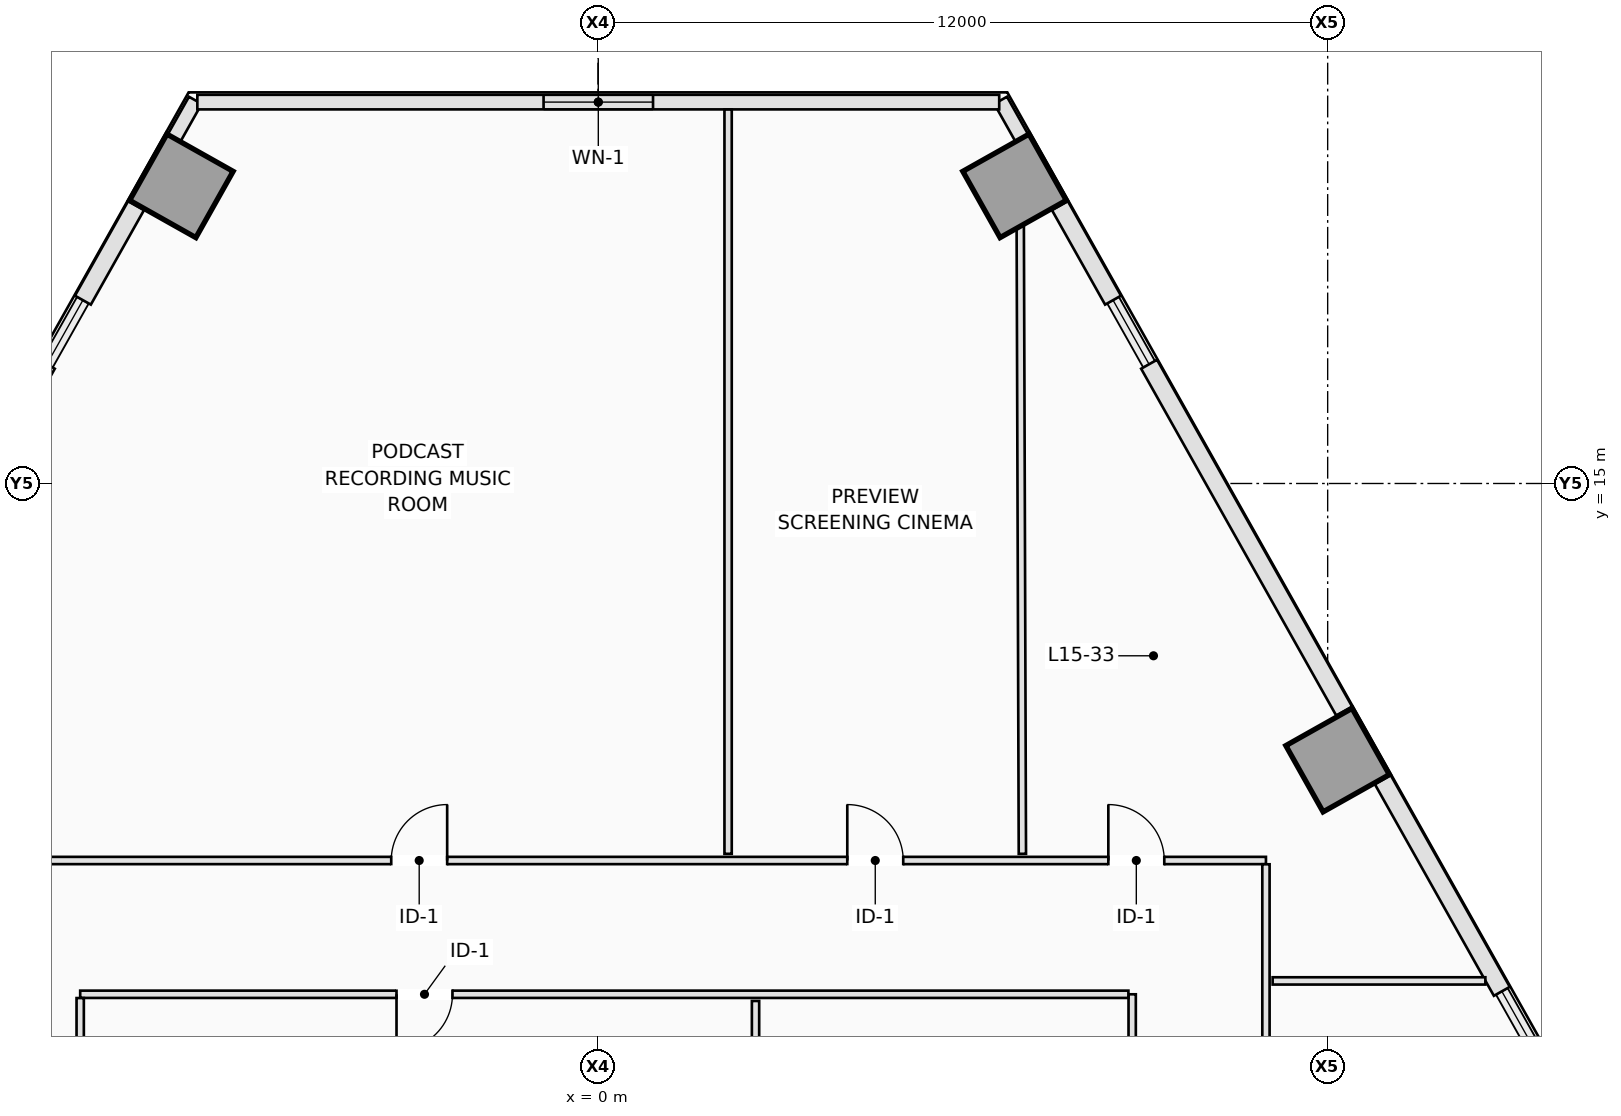
"""IFC4 building model, lengths in metres.
Left out: names, types, materials, properties, quantities, classifications, styles, units other than length and angle.
Written with IfcOpenShell. Run it as: python <this file> out.ifc"""

import sys

from ifc_helpers import new_model, si_unit, direction, frame, frame_2d, origin, origin_2d, place, context, subcontext, project, spatial, rectangle, extrude, element, fill, save


model = new_model("IFC4")
c1 = context("Model", 3, precision=1e-05, world=origin(), true_north=direction((0.0, 1.0)))
c2 = subcontext(c1, "Body", "Model", "MODEL_VIEW")
j1 = project(units=[si_unit("LENGTHUNIT", "METRE"), si_unit("PLANEANGLEUNIT", "RADIAN")], contexts=[c1])
p1 = place(None, origin())
s1 = spatial("IfcSite", under=j1, at=p1, CompositionType="ELEMENT")
p2 = place(p1, origin())
s2 = spatial("IfcBuilding", under=s1, at=p2, CompositionType="ELEMENT")
p3 = place(p2, frame((0.0, 0.0, 59.1)))
s3 = spatial("IfcBuildingStorey", under=s2, at=p3, CompositionType="ELEMENT", Elevation=59.1)
for number, where, z_axis, x_axis in (
    (1, (12.163, 10.451, 0.0), (0.0, 0.0, 1.0), (0.872, 0.49, 0.0)),
    (2, (6.851, 19.895, 0.0), (0.0, 0.0, 1.0), (0.872, 0.49, 0.0)),
    (3, (-6.851, 19.895, 0.0), (0.0, 0.0, 1.0), (-0.872, 0.49, 0.0)),
):
    element("IfcColumn", number, at=place(p3, frame(where, z_axis=z_axis, x_axis=x_axis)), inside=s3, PredefinedType="COLUMN", context=c2, shape_type="SweptSolid", body=[
        extrude(rectangle(XDim=1.25, YDim=1.25, at=origin_2d()), origin(), (0.0, 0.0, 1.0), 3.5),
    ])
p4 = place(p3, frame((6.622, 21.301, 0.0), z_axis=(0.0, 0.0, 1.0), x_axis=(0.490261239633, -0.871575537125, 0.0)))
e4 = element("IfcWall", 4, at=p4, inside=s3, PredefinedType="STANDARD", context=c2, shape_type="SweptSolid", body=[
    extrude(rectangle(XDim=0.708, YDim=0.24, at=frame_2d((0.354, 0.0))), origin(), (0.0, 0.0, 1.0), 3.25),
])
p5 = place(p3, frame((7.597, 19.569, 0.0), z_axis=(0.0, 0.0, 1.0), x_axis=(0.490183206509, -0.871619426158, 0.0)))
e5 = element("IfcWall", 5, at=p5, inside=s3, PredefinedType="STANDARD", context=c2, shape_type="SweptSolid", body=[
    extrude(rectangle(XDim=1.782, YDim=0.3, at=frame_2d((0.891, 0.0))), origin(), (0.0, 0.0, 1.0), 3.25),
])
p6 = place(p3, frame((9.063, 16.961, 0.0), z_axis=(0.0, 0.0, 1.0), x_axis=(0.490261239633, -0.871575537125, 0.0)))
e6 = element("IfcWall", 6, at=p6, inside=s3, PredefinedType="STANDARD", context=c2, shape_type="SweptSolid", body=[
    extrude(rectangle(XDim=6.543, YDim=0.3, at=frame_2d((3.272, 0.0))), origin(), (0.0, 0.0, 1.0), 3.25),
])
p7 = place(p3, frame((12.906, 10.129, 0.0), z_axis=(0.0, 0.0, 1.0), x_axis=(0.49028736482, -0.871560841191, 0.0)))
e7 = element("IfcWall", 7, at=p7, inside=s3, PredefinedType="STANDARD", context=c2, shape_type="SweptSolid", body=[
    extrude(rectangle(XDim=3.993, YDim=0.3, at=frame_2d((1.997, 0.0))), origin(), (0.0, 0.0, 1.0), 3.25),
])
p8 = place(p3, frame((-6.969, 20.684, 0.0), z_axis=(0.0, 0.0, 1.0), x_axis=(0.490261239633, 0.871575537125, 0.0)))
e8 = element("IfcWall", 8, at=p8, inside=s3, PredefinedType="STANDARD", context=c2, shape_type="SweptSolid", body=[
    extrude(rectangle(XDim=0.708, YDim=0.24, at=frame_2d((0.354, 0.0))), origin(), (0.0, 0.0, 1.0), 3.25),
])
p9 = place(p3, frame((-12.271, 11.258, 0.0), z_axis=(0.0, 0.0, 1.0), x_axis=(0.490261239633, 0.871575537125, 0.0)))
e9 = element("IfcWall", 9, at=p9, inside=s3, PredefinedType="STANDARD", context=c2, shape_type="SweptSolid", body=[
    extrude(rectangle(XDim=6.543, YDim=0.3, at=frame_2d((3.272, 0.0))), origin(), (0.0, 0.0, 1.0), 3.25),
])
p10 = place(p3, frame((-8.47, 18.015, 0.0), z_axis=(0.0, 0.0, 1.0), x_axis=(0.490183206509, 0.871619426158, 0.0)))
e10 = element("IfcWall", 10, at=p10, inside=s3, PredefinedType="STANDARD", context=c2, shape_type="SweptSolid", body=[
    extrude(rectangle(XDim=1.782, YDim=0.3, at=frame_2d((0.891, 0.0))), origin(), (0.0, 0.0, 1.0), 3.25),
])
p11 = place(p3, frame((6.598, 21.272, 0.0), z_axis=(0.0, 0.0, 1.0), x_axis=(-1.0, 0.0, 0.0)))
e11 = element("IfcWall", 11, at=p11, inside=s3, PredefinedType="STANDARD", context=c2, shape_type="SweptSolid", body=[
    extrude(rectangle(XDim=13.187, YDim=0.24, at=frame_2d((6.593, 0.0))), origin(), (0.0, 0.0, 1.0), 3.25),
])
p12 = place(p11, frame((5.693, 0.0, 0.9)))
e12 = element("IfcOpeningElement", 12, at=p12, cuts=e11, PredefinedType="OPENING", context=c2, shape_type="SweptSolid", body=[
    extrude(rectangle(XDim=1.8, YDim=2.1, at=frame_2d((0.9, 1.05))), frame((0.0, 0.13, 0.0), z_axis=(0.0, -1.0, 0.0), x_axis=(1.0, 0.0, 0.0)), (0.0, 0.0, 1.0), 0.26),
])
p13 = place(p3, frame((-10.653, 8.8, 0.0), z_axis=(0.0, 0.0, 1.0), x_axis=(1.0, 0.0, 0.0)))
e13 = element("IfcWall", 13, at=p13, inside=s3, PredefinedType="PARTITIONING", context=c2, shape_type="SweptSolid", body=[
    extrude(rectangle(XDim=21.638, YDim=0.12, at=frame_2d((10.819, 0.0))), origin(), (0.0, 0.0, 1.0), 3.25),
])
p14 = place(p13, frame((14.753, 0.0, 0.0)))
e14 = element("IfcOpeningElement", 14, at=p14, cuts=e13, PredefinedType="OPENING", context=c2, shape_type="SweptSolid", body=[
    extrude(rectangle(XDim=0.92, YDim=2.12, at=frame_2d((0.46, 1.06))), frame((0.0, 0.07, 0.0), z_axis=(0.0, -1.0, 0.0), x_axis=(1.0, 0.0, 0.0)), (0.0, 0.0, 1.0), 0.14),
])
p15 = place(p13, frame((7.253, 0.0, 0.0)))
e15 = element("IfcOpeningElement", 15, at=p15, cuts=e13, PredefinedType="OPENING", context=c2, shape_type="SweptSolid", body=[
    extrude(rectangle(XDim=0.92, YDim=2.12, at=frame_2d((0.46, 1.06))), frame((0.0, 0.07, 0.0), z_axis=(0.0, -1.0, 0.0), x_axis=(1.0, 0.0, 0.0)), (0.0, 0.0, 1.0), 0.14),
])
p16 = place(p13, frame((19.046, 0.0, 0.0)))
e16 = element("IfcOpeningElement", 16, at=p16, cuts=e13, PredefinedType="OPENING", context=c2, shape_type="SweptSolid", body=[
    extrude(rectangle(XDim=0.92, YDim=2.12, at=frame_2d((0.46, 1.06))), frame((0.0, 0.07, 0.0), z_axis=(0.0, -1.0, 0.0), x_axis=(1.0, 0.0, 0.0)), (0.0, 0.0, 1.0), 0.14),
])
p17 = place(p3, frame((10.985, 8.738, 0.0), z_axis=(0.0, 0.0, 1.0), x_axis=(0.0, -1.0, 0.0)))
e17 = element("IfcWall", 17, at=p17, inside=s3, PredefinedType="PARTITIONING", context=c2, shape_type="SweptSolid", body=[
    extrude(rectangle(XDim=11.138, YDim=0.12, at=frame_2d((5.569, 0.0))), origin(), (0.0, 0.0, 1.0), 3.25),
])
p18 = place(p17, frame((3.838, 0.0, 0.0)))
e18 = element("IfcOpeningElement", 18, at=p18, cuts=e17, PredefinedType="OPENING", context=c2, shape_type="SweptSolid", body=[
    extrude(rectangle(XDim=0.92, YDim=2.12, at=frame_2d((0.46, 1.06))), frame((0.0, 0.07, 0.0), z_axis=(0.0, -1.0, 0.0), x_axis=(1.0, 0.0, 0.0)), (0.0, 0.0, 1.0), 0.14),
])
p19 = place(p3, frame((8.785, -2.338, 0.0), z_axis=(0.0, 0.0, 1.0), x_axis=(0.0, 1.0, 0.0)))
e19 = element("IfcWall", 19, at=p19, inside=s3, PredefinedType="PARTITIONING", context=c2, shape_type="SweptSolid", body=[
    extrude(rectangle(XDim=8.938, YDim=0.12, at=frame_2d((4.469, 0.0))), origin(), (0.0, 0.0, 1.0), 3.25),
])
p20 = place(p19, frame((3.978, 0.0, 0.0)))
e20 = element("IfcOpeningElement", 20, at=p20, cuts=e19, PredefinedType="OPENING", context=c2, shape_type="SweptSolid", body=[
    extrude(rectangle(XDim=0.92, YDim=2.12, at=frame_2d((0.46, 1.06))), frame((0.0, 0.07, 0.0), z_axis=(0.0, -1.0, 0.0), x_axis=(1.0, 0.0, 0.0)), (0.0, 0.0, 1.0), 0.14),
])
p21 = place(p3, frame((8.723, 6.6, 0.0), z_axis=(0.0, 0.0, 1.0), x_axis=(-1.0, 0.0, 0.0)))
e21 = element("IfcWall", 21, at=p21, inside=s3, PredefinedType="PARTITIONING", context=c2, shape_type="SweptSolid", body=[
    extrude(rectangle(XDim=17.238, YDim=0.12, at=frame_2d((8.619, 0.0))), origin(), (0.0, 0.0, 1.0), 3.25),
])
p22 = place(p21, frame((11.116, 0.0, 0.0)))
e22 = element("IfcOpeningElement", 22, at=p22, cuts=e21, PredefinedType="OPENING", context=c2, shape_type="SweptSolid", body=[
    extrude(rectangle(XDim=0.92, YDim=2.12, at=frame_2d((0.46, 1.06))), frame((0.0, 0.07, 0.0), z_axis=(0.0, -1.0, 0.0), x_axis=(1.0, 0.0, 0.0)), (0.0, 0.0, 1.0), 0.14),
])
p23 = place(p3, frame((-8.515, 6.538, 0.0), z_axis=(0.0, 0.0, 1.0), x_axis=(0.0, -1.0, 0.0)))
e23 = element("IfcWall", 23, at=p23, inside=s3, PredefinedType="PARTITIONING", context=c2, shape_type="SweptSolid", body=[
    extrude(rectangle(XDim=8.876, YDim=0.12, at=frame_2d((4.438, 0.0))), origin(), (0.0, 0.0, 1.0), 3.25),
])
p24 = place(p3, frame((2.14, 8.91, 0.0), z_axis=(0.0, 0.0, 1.0), x_axis=(0.0, 1.0, 0.0)))
e24 = element("IfcWall", 24, at=p24, inside=s3, PredefinedType="PARTITIONING", context=c2, shape_type="SweptSolid", body=[
    extrude(rectangle(XDim=12.24, YDim=0.12, at=frame_2d((6.12, 0.0))), origin(), (0.0, 0.0, 1.0), 3.25),
])
p25 = place(p3, frame((6.944, 19.228, 0.0), z_axis=(0.0, 0.0, 1.0), x_axis=(0.003407296486, -0.999994195148, 0.0)))
e25 = element("IfcWall", 25, at=p25, inside=s3, PredefinedType="PARTITIONING", context=c2, shape_type="SweptSolid", body=[
    extrude(rectangle(XDim=10.318, YDim=0.12, at=frame_2d((5.159, 0.0))), origin(), (0.0, 0.0, 1.0), 3.25),
])
p26 = place(p3, frame((14.593, 6.82, 0.0), z_axis=(0.0, 0.0, 1.0), x_axis=(-1.0, 0.0, 0.0)))
e26 = element("IfcWall", 26, at=p26, inside=s3, PredefinedType="PARTITIONING", context=c2, shape_type="SweptSolid", body=[
    extrude(rectangle(XDim=3.498, YDim=0.12, at=frame_2d((1.749, 0.0))), origin(), (0.0, 0.0, 1.0), 3.25),
])
p27 = place(p3, frame((2.591, 6.49, 0.0), z_axis=(0.0, 0.0, 1.0), x_axis=(0.0, -1.0, 0.0)))
e27 = element("IfcWall", 27, at=p27, inside=s3, PredefinedType="PARTITIONING", context=c2, shape_type="SweptSolid", body=[
    extrude(rectangle(XDim=8.78, YDim=0.12, at=frame_2d((4.39, 0.0))), origin(), (0.0, 0.0, 1.0), 3.25),
])
p28 = place(p12, origin())
e28 = element("IfcWindow", 28, at=p28, inside=s3, PartitioningType="SINGLE_PANEL", PredefinedType="WINDOW", context=c2, shape_type="SweptSolid", body=[
    extrude(rectangle(XDim=1.8, YDim=2.1, at=frame_2d((0.9, 1.05))), frame((0.0, 0.03, 0.0), z_axis=(0.0, -1.0, 0.0), x_axis=(1.0, 0.0, 0.0)), (0.0, 0.0, 1.0), 0.06),
])
fill(e12, e28)
p29 = place(p14, origin())
e29 = element("IfcDoor", 29, at=p29, inside=s3, OperationType="SINGLE_SWING_LEFT", PredefinedType="DOOR", context=c2, shape_type="SweptSolid", body=[
    extrude(rectangle(XDim=0.92, YDim=2.12, at=frame_2d((0.46, 1.06))), frame((0.0, 0.025, 0.0), z_axis=(0.0, -1.0, 0.0), x_axis=(1.0, 0.0, 0.0)), (0.0, 0.0, 1.0), 0.05),
])
fill(e14, e29)
p30 = place(p15, origin())
e30 = element("IfcDoor", 30, at=p30, inside=s3, OperationType="SINGLE_SWING_RIGHT", PredefinedType="DOOR", context=c2, shape_type="SweptSolid", body=[
    extrude(rectangle(XDim=0.92, YDim=2.12, at=frame_2d((0.46, 1.06))), frame((0.0, 0.025, 0.0), z_axis=(0.0, -1.0, 0.0), x_axis=(1.0, 0.0, 0.0)), (0.0, 0.0, 1.0), 0.05),
])
fill(e15, e30)
p31 = place(p16, origin())
e31 = element("IfcDoor", 31, at=p31, inside=s3, OperationType="SINGLE_SWING_LEFT", PredefinedType="DOOR", context=c2, shape_type="SweptSolid", body=[
    extrude(rectangle(XDim=0.92, YDim=2.12, at=frame_2d((0.46, 1.06))), frame((0.0, 0.025, 0.0), z_axis=(0.0, -1.0, 0.0), x_axis=(1.0, 0.0, 0.0)), (0.0, 0.0, 1.0), 0.05),
])
fill(e16, e31)
p32 = place(p22, origin())
e32 = element("IfcDoor", 32, at=p32, inside=s3, OperationType="SINGLE_SWING_RIGHT", PredefinedType="DOOR", context=c2, shape_type="SweptSolid", body=[
    extrude(rectangle(XDim=0.92, YDim=2.12, at=frame_2d((0.46, 1.06))), frame((0.0, 0.025, 0.0), z_axis=(0.0, -1.0, 0.0), x_axis=(1.0, 0.0, 0.0)), (0.0, 0.0, 1.0), 0.05),
])
fill(e22, e32)
save(model, sys.argv[1])
